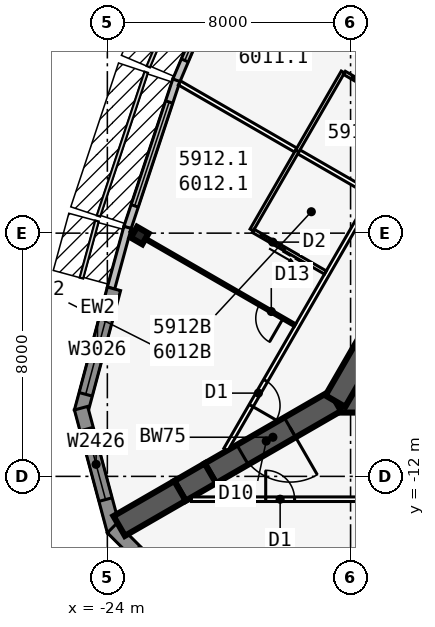
"""IFC4 building model, lengths in metres.
Left out: names, types, materials, properties, quantities, classifications, styles, units other than length and angle.
Written with IfcOpenShell. Run it as: python <this file> out.ifc"""

import sys

from ifc_helpers import new_model, si_unit, direction, frame, frame_2d, origin, origin_2d, place, context, subcontext, project, spatial, polyline, rectangle, i_section, outline, extrude, element, fill, save


model = new_model("IFC4")
c1 = context("Model", 3, precision=1e-05, world=origin(), true_north=direction((0.0, 1.0)))
c2 = subcontext(c1, "Body", "Model", "MODEL_VIEW")
j1 = project(units=[si_unit("LENGTHUNIT", "METRE"), si_unit("PLANEANGLEUNIT", "RADIAN")], contexts=[c1])
p1 = place(None, origin())
s1 = spatial("IfcSite", under=j1, at=p1, CompositionType="ELEMENT")
p2 = place(p1, origin())
s2 = spatial("IfcBuilding", under=s1, at=p2, CompositionType="ELEMENT")
p3 = place(p2, frame((0.0, 0.0, 222.5)))
s3 = spatial("IfcBuildingStorey", under=s2, at=p3, CompositionType="ELEMENT", Elevation=222.5)
p4 = place(p3, frame((-16.5, -9.526, 0.0), z_axis=(0.0, 0.0, 1.0), x_axis=(1.0, 0.0, 0.0)))
e1 = element("IfcWall", 1, at=p4, inside=s3, PredefinedType="SHEAR", context=c2, shape_type="SweptSolid", body=[
    extrude(rectangle(XDim=33.0, YDim=0.75, at=frame_2d((16.5, 0.0))), origin(), (0.0, 0.0, 1.0), 3.6),
])
p5 = place(p4, frame((14.05, 0.0, 0.0)))
e2 = element("IfcOpeningElement", 2, at=p5, cuts=e1, PredefinedType="OPENING", context=c2, shape_type="SweptSolid", body=[
    extrude(rectangle(XDim=1.8, YDim=2.13, at=frame_2d((0.9, 1.065))), frame((0.0, 0.385, 0.0), z_axis=(0.0, -1.0, 0.0), x_axis=(1.0, 0.0, 0.0)), (0.0, 0.0, 1.0), 0.77),
])
p6 = place(p3, frame((0.0, 19.052, 0.0), z_axis=(0.0, 0.0, 1.0), x_axis=(-0.499999749417, -0.866025548458, 0.0)))
e3 = element("IfcWall", 3, at=p6, inside=s3, PredefinedType="SHEAR", context=c2, shape_type="SweptSolid", body=[
    extrude(rectangle(XDim=33.0, YDim=0.75, at=frame_2d((16.5, 0.0))), origin(), (0.0, 0.0, 1.0), 3.6),
])
p7 = place(p6, frame((14.15, 0.0, 0.0)))
e4 = element("IfcOpeningElement", 4, at=p7, cuts=e3, PredefinedType="OPENING", context=c2, shape_type="SweptSolid", body=[
    extrude(rectangle(XDim=1.8, YDim=2.13, at=frame_2d((0.9, 1.065))), frame((0.0, 0.385, 0.0), z_axis=(0.0, -1.0, 0.0), x_axis=(1.0, 0.0, 0.0)), (0.0, 0.0, 1.0), 0.77),
])
p8 = place(p6, frame((12.6, 0.0, 0.0)))
e5 = element("IfcOpeningElement", 5, at=p8, cuts=e3, PredefinedType="OPENING", context=c2, shape_type="SweptSolid", body=[
    extrude(rectangle(XDim=1.0, YDim=2.13, at=frame_2d((0.5, 1.065))), frame((0.0, 0.385, 0.0), z_axis=(0.0, -1.0, 0.0), x_axis=(1.0, 0.0, 0.0)), (0.0, 0.0, 1.0), 0.77),
])
p9 = place(p3, frame((-16.5, -9.526, 0.0), z_axis=(0.0, 0.0, 1.0), x_axis=(-0.866031398331, -0.499989616998, 0.0)))
e6 = element("IfcWall", 6, at=p9, inside=s3, PredefinedType="SHEAR", context=c2, shape_type="SweptSolid", body=[
    extrude(rectangle(XDim=4.746, YDim=0.75, at=frame_2d((2.373, 0.0))), origin(), (0.0, 0.0, 1.0), 3.6),
])
p10 = place(p9, frame((1.725, 0.0, 0.0)))
e7 = element("IfcOpeningElement", 7, at=p10, cuts=e6, PredefinedType="OPENING", context=c2, shape_type="SweptSolid", body=[
    extrude(rectangle(XDim=1.8, YDim=2.13, at=frame_2d((0.9, 1.065))), frame((0.0, 0.385, 0.0), z_axis=(0.0, -1.0, 0.0), x_axis=(1.0, 0.0, 0.0)), (0.0, 0.0, 1.0), 0.77),
])
p11 = place(p3, frame((-20.61, -11.899, 0.0), z_axis=(0.0, 0.0, 1.0), x_axis=(-0.866009537788, -0.500027479704, 0.0)))
e8 = element("IfcWall", 8, at=p11, inside=s3, PredefinedType="SHEAR", context=c2, shape_type="SweptSolid", body=[
    extrude(rectangle(XDim=1.155, YDim=0.75, at=frame_2d((0.577, 0.0))), origin(), (0.0, 0.0, 1.0), 3.6),
])
p12 = place(p3, frame((-21.61, -12.477, 0.0), z_axis=(0.0, 0.0, 1.0), x_axis=(-0.866055313784, -0.499948190782, 0.0)))
e9 = element("IfcWall", 9, at=p12, inside=s3, PredefinedType="SHEAR", context=c2, shape_type="SweptSolid", body=[
    extrude(rectangle(XDim=2.309, YDim=0.75, at=frame_2d((1.155, 0.0))), origin(), (0.0, 0.0, 1.0), 3.6),
])
p13 = place(p3, frame((-22.937, -4.078, 0.0), z_axis=(0.0, 0.0, 1.0), x_axis=(-0.5, -0.866025403784, 0.0)))
e10 = element("IfcColumn", 10, at=p13, inside=s3, PredefinedType="COLUMN", context=c2, shape_type="SweptSolid", body=[
    extrude(i_section(OverallWidth=0.411, OverallDepth=0.434, WebThickness=0.036, FlangeThickness=0.057, at=origin_2d()), origin(), (0.0, 0.0, 1.0), 3.6),
])
p14 = place(p3, frame((-19.768, 5.657, 0.0), z_axis=(0.0, 0.0, 1.0), x_axis=(-0.390096809471, -0.920773848044, 0.0)))
e11 = element("IfcWall", 11, at=p14, inside=s3, PredefinedType="STANDARD", context=c2, shape_type="SweptSolid", body=[
    extrude(rectangle(XDim=5.038, YDim=0.25, at=frame_2d((2.519, 0.0))), origin(), (0.0, 0.0, 1.0), 3.435),
])
p15 = place(p14, frame((0.719, 0.0, 0.45)))
e12 = element("IfcOpeningElement", 12, at=p15, cuts=e11, PredefinedType="OPENING", context=c2, shape_type="SweptSolid", body=[
    extrude(rectangle(XDim=3.6, YDim=2.6, at=frame_2d((1.8, 1.3))), frame((0.0, 0.135, 0.0), z_axis=(0.0, -1.0, 0.0), x_axis=(1.0, 0.0, 0.0)), (0.0, 0.0, 1.0), 0.27),
])
p16 = place(p3, frame((-21.729, 1.028, 0.0), z_axis=(0.0, 0.0, 1.0), x_axis=(-0.315108478109, -0.949055660656, 0.0)))
e13 = element("IfcWall", 13, at=p16, inside=s3, PredefinedType="STANDARD", context=c2, shape_type="SweptSolid", body=[
    extrude(rectangle(XDim=5.105, YDim=0.25, at=frame_2d((2.552, 0.0))), origin(), (0.0, 0.0, 1.0), 3.435),
])
p17 = place(p16, frame((0.752, 0.0, 0.45)))
e14 = element("IfcOpeningElement", 14, at=p17, cuts=e13, PredefinedType="OPENING", context=c2, shape_type="SweptSolid", body=[
    extrude(rectangle(XDim=3.6, YDim=2.6, at=frame_2d((1.8, 1.3))), frame((0.0, 0.135, 0.0), z_axis=(0.0, -1.0, 0.0), x_axis=(1.0, 0.0, 0.0)), (0.0, 0.0, 1.0), 0.27),
])
p18 = place(p3, frame((-23.336, -3.811, 0.0), z_axis=(0.0, 0.0, 1.0), x_axis=(-0.262867703986, -0.964831887015, 0.0)))
e15 = element("IfcWall", 15, at=p18, inside=s3, PredefinedType="STANDARD", context=c2, shape_type="SweptSolid", body=[
    extrude(rectangle(XDim=2.068, YDim=0.25, at=frame_2d((1.034, 0.0))), origin(), (0.0, 0.0, 1.0), 3.435),
])
p19 = place(p3, frame((-23.783, -5.832, 0.0), z_axis=(0.0, 0.0, 1.0), x_axis=(-0.258784695888, -0.965935029479, 0.0)))
e16 = element("IfcWall", 16, at=p19, inside=s3, PredefinedType="SOLIDWALL", context=c2, shape_type="SweptSolid", body=[
    extrude(rectangle(XDim=4.184, YDim=0.45, at=frame_2d((2.092, 0.0))), origin(), (0.0, 0.0, 1.0), 3.435),
])
p20 = place(p19, frame((0.592, 0.0, 0.45)))
e17 = element("IfcOpeningElement", 17, at=p20, cuts=e16, PredefinedType="OPENING", context=c2, shape_type="SweptSolid", body=[
    extrude(rectangle(XDim=3.0, YDim=2.6, at=frame_2d((1.5, 1.3))), frame((0.0, 0.235, 0.0), z_axis=(0.0, -1.0, 0.0), x_axis=(1.0, 0.0, 0.0)), (0.0, 0.0, 1.0), 0.47),
])
p21 = place(p3, frame((-24.865, -9.757, 0.0), z_axis=(0.0, 0.0, 1.0), x_axis=(0.258799282522, -0.96593112144, 0.0)))
e18 = element("IfcWall", 18, at=p21, inside=s3, PredefinedType="SOLIDWALL", context=c2, shape_type="SweptSolid", body=[
    extrude(outline(polyline([(4.184, 0.225), (4.125, 0.225), (3.705, 0.113), (3.675, 0.225), (0.0, 0.225), (0.0, -0.225), (4.184, -0.225), (4.184, 0.225)])), origin(), (0.0, 0.0, 1.0), 3.435),
])
p22 = place(p21, frame((0.713, 0.0, 0.45)))
e19 = element("IfcOpeningElement", 19, at=p22, cuts=e18, PredefinedType="OPENING", context=c2, shape_type="SweptSolid", body=[
    extrude(rectangle(XDim=2.4, YDim=2.6, at=frame_2d((1.2, 1.3))), frame((0.0, 0.235, 0.0), z_axis=(0.0, -1.0, 0.0), x_axis=(1.0, 0.0, 0.0)), (0.0, 0.0, 1.0), 0.47),
])
p23 = place(p3, frame((-23.841, -13.697, 0.0), z_axis=(0.0, 0.0, 1.0), x_axis=(0.707077605902, -0.707135955267, 0.0)))
e20 = element("IfcWall", 20, at=p23, inside=s3, PredefinedType="SOLIDWALL", context=c2, shape_type="SweptSolid", body=[
    extrude(outline(polyline([(4.184, 0.225), (0.509, 0.225), (0.479, 0.113), (0.059, 0.225), (0.0, 0.225), (0.0, -0.225), (4.184, -0.225), (4.184, 0.225)])), origin(), (0.0, 0.0, 1.0), 3.435),
])
p24 = place(p23, frame((1.071, 0.0, 0.45)))
e21 = element("IfcOpeningElement", 21, at=p24, cuts=e20, PredefinedType="OPENING", context=c2, shape_type="SweptSolid", body=[
    extrude(rectangle(XDim=2.4, YDim=2.6, at=frame_2d((1.2, 1.3))), frame((0.0, 0.235, 0.0), z_axis=(0.0, -1.0, 0.0), x_axis=(1.0, 0.0, 0.0)), (0.0, 0.0, 1.0), 0.47),
])
p25 = place(p3, frame((-21.236, -12.751, 0.0), z_axis=(0.0, 0.0, 1.0), x_axis=(1.0, 0.0, 0.0)))
e22 = element("IfcWall", 22, at=p25, inside=s3, PredefinedType="PARTITIONING", context=c2, shape_type="SweptSolid", body=[
    extrude(rectangle(XDim=42.472, YDim=0.15, at=frame_2d((21.236, 0.0))), origin(), (0.0, 0.0, 1.0), 3.435),
])
p26 = place(p25, frame((2.444, 0.0, 0.0)))
e23 = element("IfcOpeningElement", 23, at=p26, cuts=e22, PredefinedType="OPENING", context=c2, shape_type="SweptSolid", body=[
    extrude(rectangle(XDim=0.95, YDim=2.13, at=frame_2d((0.475, 1.065))), frame((0.0, 0.085, 0.0), z_axis=(0.0, -1.0, 0.0), x_axis=(1.0, 0.0, 0.0)), (0.0, 0.0, 1.0), 0.17),
])
p27 = place(p25, frame((13.261, 0.0, 0.0)))
e24 = element("IfcOpeningElement", 24, at=p27, cuts=e22, PredefinedType="OPENING", context=c2, shape_type="SweptSolid", body=[
    extrude(rectangle(XDim=0.95, YDim=2.13, at=frame_2d((0.475, 1.065))), frame((0.0, 0.085, 0.0), z_axis=(0.0, -1.0, 0.0), x_axis=(1.0, 0.0, 0.0)), (0.0, 0.0, 1.0), 0.17),
])
p28 = place(p25, frame((23.236, 0.0, 0.0)))
e25 = element("IfcOpeningElement", 25, at=p28, cuts=e22, PredefinedType="OPENING", context=c2, shape_type="SweptSolid", body=[
    extrude(rectangle(XDim=1.0, YDim=2.13, at=frame_2d((0.5, 1.065))), frame((0.0, 0.085, 0.0), z_axis=(0.0, -1.0, 0.0), x_axis=(1.0, 0.0, 0.0)), (0.0, 0.0, 1.0), 0.17),
])
p29 = place(p25, frame((29.461, 0.0, 0.0)))
e26 = element("IfcOpeningElement", 26, at=p29, cuts=e22, PredefinedType="OPENING", context=c2, shape_type="SweptSolid", body=[
    extrude(rectangle(XDim=0.95, YDim=2.13, at=frame_2d((0.475, 1.065))), frame((0.0, 0.085, 0.0), z_axis=(0.0, -1.0, 0.0), x_axis=(1.0, 0.0, 0.0)), (0.0, 0.0, 1.0), 0.17),
])
p30 = place(p25, frame((39.077, 0.0, 0.0)))
e27 = element("IfcOpeningElement", 27, at=p30, cuts=e22, PredefinedType="OPENING", context=c2, shape_type="SweptSolid", body=[
    extrude(rectangle(XDim=0.95, YDim=2.13, at=frame_2d((0.475, 1.065))), frame((0.0, 0.085, 0.0), z_axis=(0.0, -1.0, 0.0), x_axis=(1.0, 0.0, 0.0)), (0.0, 0.0, 1.0), 0.17),
])
p31 = place(p3, frame((-0.425, 22.966, 0.0), z_axis=(0.0, 0.0, 1.0), x_axis=(-0.500000265775, -0.866025250339, 0.0)))
e28 = element("IfcWall", 28, at=p31, inside=s3, PredefinedType="PARTITIONING", context=c2, shape_type="SweptSolid", body=[
    extrude(rectangle(XDim=39.354, YDim=0.15, at=frame_2d((19.677, 0.0))), origin(), (0.0, 0.0, 1.0), 3.435),
])
p32 = place(p31, frame((1.665, 0.0, 0.0)))
e29 = element("IfcOpeningElement", 29, at=p32, cuts=e28, PredefinedType="OPENING", context=c2, shape_type="SweptSolid", body=[
    extrude(rectangle(XDim=0.95, YDim=2.13, at=frame_2d((0.475, 1.065))), frame((0.0, 0.085, 0.0), z_axis=(0.0, -1.0, 0.0), x_axis=(1.0, 0.0, 0.0)), (0.0, 0.0, 1.0), 0.17),
])
p33 = place(p31, frame((11.702, 0.0, 0.0)))
e30 = element("IfcOpeningElement", 30, at=p33, cuts=e28, PredefinedType="OPENING", context=c2, shape_type="SweptSolid", body=[
    extrude(rectangle(XDim=0.95, YDim=2.13, at=frame_2d((0.475, 1.065))), frame((0.0, 0.085, 0.0), z_axis=(0.0, -1.0, 0.0), x_axis=(1.0, 0.0, 0.0)), (0.0, 0.0, 1.0), 0.17),
])
p34 = place(p31, frame((21.702, 0.0, 0.0)))
e31 = element("IfcOpeningElement", 31, at=p34, cuts=e28, PredefinedType="OPENING", context=c2, shape_type="SweptSolid", body=[
    extrude(rectangle(XDim=0.95, YDim=2.13, at=frame_2d((0.475, 1.065))), frame((0.0, 0.085, 0.0), z_axis=(0.0, -1.0, 0.0), x_axis=(1.0, 0.0, 0.0)), (0.0, 0.0, 1.0), 0.17),
])
p35 = place(p31, frame((36.739, 0.0, 0.0)))
e32 = element("IfcOpeningElement", 32, at=p35, cuts=e28, PredefinedType="OPENING", context=c2, shape_type="SweptSolid", body=[
    extrude(rectangle(XDim=0.95, YDim=2.13, at=frame_2d((0.475, 1.065))), frame((0.0, 0.085, 0.0), z_axis=(0.0, -1.0, 0.0), x_axis=(1.0, 0.0, 0.0)), (0.0, 0.0, 1.0), 0.17),
])
p36 = place(p3, frame((-12.829, 1.633, 0.0), z_axis=(0.0, 0.0, 1.0), x_axis=(-0.866030558329, 0.49999107196, 0.0)))
e33 = element("IfcWall", 33, at=p36, inside=s3, PredefinedType="PARTITIONING", context=c2, shape_type="SweptSolid", body=[
    extrude(rectangle(XDim=7.894, YDim=0.1, at=frame_2d((3.947, 0.0))), origin(), (0.0, 0.0, 1.0), 2.589),
])
p37 = place(p36, frame((0.45, 0.0, 0.0)))
e34 = element("IfcOpeningElement", 34, at=p37, cuts=e33, PredefinedType="OPENING", context=c2, shape_type="SweptSolid", body=[
    extrude(rectangle(XDim=0.9, YDim=2.13, at=frame_2d((0.45, 1.065))), frame((0.0, 0.06, 0.0), z_axis=(0.0, -1.0, 0.0), x_axis=(1.0, 0.0, 0.0)), (0.0, 0.0, 1.0), 0.12),
])
p38 = place(p3, frame((-15.329, -2.697, 0.0), z_axis=(0.0, 0.0, 1.0), x_axis=(-0.866032413668, 0.499987858329, 0.0)))
e35 = element("IfcWall", 35, at=p38, inside=s3, PredefinedType="PARTITIONING", context=c2, shape_type="SweptSolid", body=[
    extrude(rectangle(XDim=7.273, YDim=0.15, at=frame_2d((3.636, 0.0))), origin(), (0.0, 0.0, 1.0), 2.589),
])
p39 = place(p3, frame((-17.829, -7.027, 0.0), z_axis=(0.0, 0.0, 1.0), x_axis=(-0.866026604282, 0.499997920671, 0.0)))
e36 = element("IfcWall", 36, at=p39, inside=s3, PredefinedType="PARTITIONING", context=c2, shape_type="SweptSolid", body=[
    extrude(rectangle(XDim=6.24, YDim=0.1, at=frame_2d((3.12, 0.0))), origin(), (0.0, 0.0, 1.0), 2.589),
])
p40 = place(p39, frame((0.45, 0.0, 0.0)))
e37 = element("IfcOpeningElement", 37, at=p40, cuts=e36, PredefinedType="OPENING", context=c2, shape_type="SweptSolid", body=[
    extrude(rectangle(XDim=0.9, YDim=2.13, at=frame_2d((0.45, 1.065))), frame((0.0, 0.06, 0.0), z_axis=(0.0, -1.0, 0.0), x_axis=(1.0, 0.0, 0.0)), (0.0, 0.0, 1.0), 0.12),
])
p41 = place(p3, frame((-16.253, 1.301, 0.0), z_axis=(0.0, 0.0, 1.0), x_axis=(-0.499990139034, -0.866031096941, 0.0)))
e38 = element("IfcWall", 38, at=p41, inside=s3, PredefinedType="PLUMBINGWALL", context=c2, shape_type="SweptSolid", body=[
    extrude(rectangle(XDim=3.0, YDim=0.12, at=frame_2d((1.5, 0.0))), origin(), (0.0, 0.0, 1.0), 3.435),
])
p42 = place(p3, frame((-13.829, -0.099, 0.0), z_axis=(0.0, 0.0, 1.0), x_axis=(-0.865997131366, 0.500048966069, 0.0)))
e39 = element("IfcWall", 39, at=p42, inside=s3, PredefinedType="PLUMBINGWALL", context=c2, shape_type="SweptSolid", body=[
    extrude(rectangle(XDim=2.74, YDim=0.12, at=frame_2d((1.37, 0.0))), origin(), (0.0, 0.0, 1.0), 3.435),
])
p43 = place(p42, frame((1.55, 0.0, 0.0)))
e40 = element("IfcOpeningElement", 40, at=p43, cuts=e39, PredefinedType="OPENING", context=c2, shape_type="SweptSolid", body=[
    extrude(rectangle(XDim=0.9, YDim=2.13, at=frame_2d((0.45, 1.065))), frame((0.0, 0.07, 0.0), z_axis=(0.0, -1.0, 0.0), x_axis=(1.0, 0.0, 0.0)), (0.0, 0.0, 1.0), 0.14),
])
p44 = place(p3, frame((-17.753, -1.297, 0.0), z_axis=(0.0, 0.0, 1.0), x_axis=(-0.499990139034, -0.866031096941, 0.0)))
e41 = element("IfcWall", 41, at=p44, inside=s3, PredefinedType="PLUMBINGWALL", context=c2, shape_type="SweptSolid", body=[
    extrude(rectangle(XDim=3.0, YDim=0.12, at=frame_2d((1.5, 0.0))), origin(), (0.0, 0.0, 1.0), 3.435),
])
p45 = place(p3, frame((-16.829, -5.295, 0.0), z_axis=(0.0, 0.0, 1.0), x_axis=(-0.866035715982, 0.499982138324, 0.0)))
e42 = element("IfcWall", 42, at=p45, inside=s3, PredefinedType="PLUMBINGWALL", context=c2, shape_type="SweptSolid", body=[
    extrude(rectangle(XDim=2.74, YDim=0.12, at=frame_2d((1.37, 0.0))), origin(), (0.0, 0.0, 1.0), 3.435),
])
p46 = place(p45, frame((1.55, 0.0, 0.0)))
e43 = element("IfcOpeningElement", 43, at=p46, cuts=e42, PredefinedType="OPENING", context=c2, shape_type="SweptSolid", body=[
    extrude(rectangle(XDim=0.9, YDim=2.13, at=frame_2d((0.45, 1.065))), frame((0.0, 0.07, 0.0), z_axis=(0.0, -1.0, 0.0), x_axis=(1.0, 0.0, 0.0)), (0.0, 0.0, 1.0), 0.14),
])
p47 = place(p15, origin())
e44 = element("IfcWindow", 44, at=p47, inside=s3, PartitioningType="SINGLE_PANEL", PredefinedType="WINDOW", context=c2, shape_type="SweptSolid", body=[
    extrude(rectangle(XDim=3.6, YDim=2.6, at=frame_2d((1.8, 1.3))), frame((0.0, 0.03, 0.0), z_axis=(0.0, -1.0, 0.0), x_axis=(1.0, 0.0, 0.0)), (0.0, 0.0, 1.0), 0.06),
])
fill(e12, e44)
p48 = place(p17, origin())
e45 = element("IfcWindow", 45, at=p48, inside=s3, PartitioningType="SINGLE_PANEL", PredefinedType="WINDOW", context=c2, shape_type="SweptSolid", body=[
    extrude(rectangle(XDim=3.6, YDim=2.6, at=frame_2d((1.8, 1.3))), frame((0.0, 0.03, 0.0), z_axis=(0.0, -1.0, 0.0), x_axis=(1.0, 0.0, 0.0)), (0.0, 0.0, 1.0), 0.06),
])
fill(e14, e45)
p49 = place(p20, origin())
e46 = element("IfcWindow", 46, at=p49, inside=s3, PartitioningType="SINGLE_PANEL", PredefinedType="WINDOW", context=c2, shape_type="SweptSolid", body=[
    extrude(rectangle(XDim=3.0, YDim=2.6, at=frame_2d((1.5, 1.3))), frame((0.0, 0.03, 0.0), z_axis=(0.0, -1.0, 0.0), x_axis=(1.0, 0.0, 0.0)), (0.0, 0.0, 1.0), 0.06),
])
fill(e17, e46)
p50 = place(p22, origin())
e47 = element("IfcWindow", 47, at=p50, inside=s3, PartitioningType="SINGLE_PANEL", PredefinedType="WINDOW", context=c2, shape_type="SweptSolid", body=[
    extrude(rectangle(XDim=2.4, YDim=2.6, at=frame_2d((1.2, 1.3))), frame((0.0, 0.03, 0.0), z_axis=(0.0, -1.0, 0.0), x_axis=(1.0, 0.0, 0.0)), (0.0, 0.0, 1.0), 0.06),
])
fill(e19, e47)
p51 = place(p26, origin())
e48 = element("IfcDoor", 48, at=p51, inside=s3, OperationType="SINGLE_SWING_LEFT", PredefinedType="DOOR", context=c2, shape_type="SweptSolid", body=[
    extrude(rectangle(XDim=0.95, YDim=2.13, at=frame_2d((0.475, 1.065))), frame((0.0, 0.025, 0.0), z_axis=(0.0, -1.0, 0.0), x_axis=(1.0, 0.0, 0.0)), (0.0, 0.0, 1.0), 0.05),
])
fill(e23, e48)
p52 = place(p40, origin())
e49 = element("IfcDoor", 49, at=p52, inside=s3, OperationType="SINGLE_SWING_LEFT", PredefinedType="DOOR", context=c2, shape_type="SweptSolid", body=[
    extrude(rectangle(XDim=0.9, YDim=2.13, at=frame_2d((0.45, 1.065))), frame((0.0, 0.025, 0.0), z_axis=(0.0, -1.0, 0.0), x_axis=(1.0, 0.0, 0.0)), (0.0, 0.0, 1.0), 0.05),
])
fill(e37, e49)
p53 = place(p43, origin())
e50 = element("IfcDoor", 50, at=p53, inside=s3, OperationType="SLIDING_TO_LEFT", PredefinedType="DOOR", context=c2, shape_type="SweptSolid", body=[
    extrude(rectangle(XDim=0.9, YDim=2.13, at=frame_2d((0.45, 1.065))), frame((0.0, 0.025, 0.0), z_axis=(0.0, -1.0, 0.0), x_axis=(1.0, 0.0, 0.0)), (0.0, 0.0, 1.0), 0.05),
])
fill(e40, e50)
p54 = place(p46, origin())
e51 = element("IfcDoor", 51, at=p54, inside=s3, OperationType="SLIDING_TO_LEFT", PredefinedType="DOOR", context=c2, shape_type="SweptSolid", body=[
    extrude(rectangle(XDim=0.9, YDim=2.13, at=frame_2d((0.45, 1.065))), frame((0.0, 0.025, 0.0), z_axis=(0.0, -1.0, 0.0), x_axis=(1.0, 0.0, 0.0)), (0.0, 0.0, 1.0), 0.05),
])
fill(e43, e51)
p55 = place(p35, origin())
e52 = element("IfcDoor", 52, at=p55, inside=s3, OperationType="SINGLE_SWING_RIGHT", PredefinedType="DOOR", context=c2, shape_type="SweptSolid", body=[
    extrude(rectangle(XDim=0.95, YDim=2.13, at=frame_2d((0.475, 1.065))), frame((0.0, 0.025, 0.0), z_axis=(0.0, -1.0, 0.0), x_axis=(1.0, 0.0, 0.0)), (0.0, 0.0, 1.0), 0.05),
])
fill(e32, e52)
p56 = place(p10, origin())
e53 = element("IfcDoor", 53, at=p56, inside=s3, OperationType="DOUBLE_DOOR_DOUBLE_SWING", PredefinedType="DOOR", context=c2, shape_type="SweptSolid", body=[
    extrude(rectangle(XDim=1.8, YDim=2.13, at=frame_2d((0.9, 1.065))), frame((0.0, 0.025, 0.0), z_axis=(0.0, -1.0, 0.0), x_axis=(1.0, 0.0, 0.0)), (0.0, 0.0, 1.0), 0.05),
])
fill(e7, e53)
save(model, sys.argv[1])
